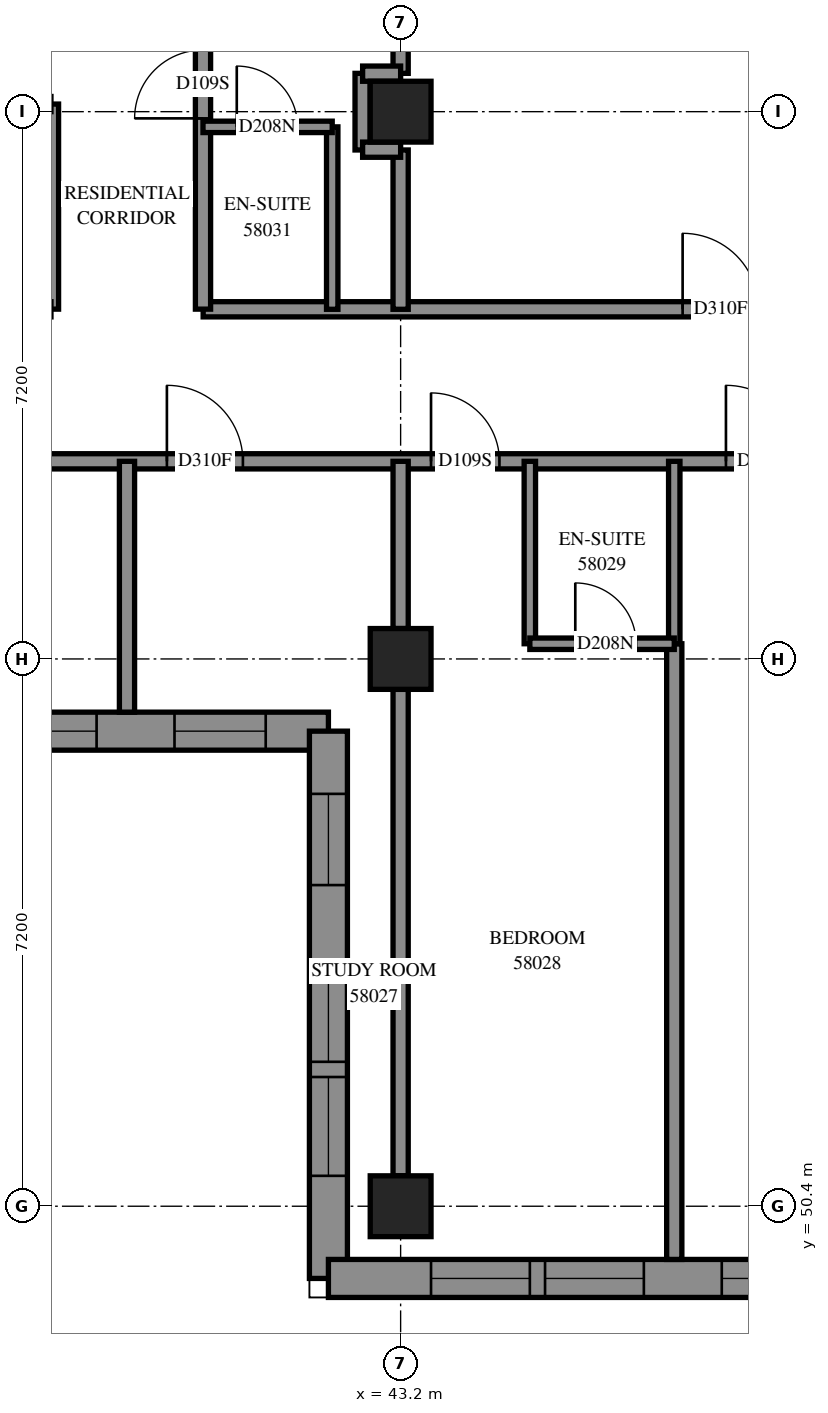
"""IFC4 building model, lengths in metres.
Left out: names, types, materials, properties, quantities, classifications, styles, units other than length and angle.
Written with IfcOpenShell. Run it as: python <this file> out.ifc"""

import sys

from ifc_helpers import new_model, si_unit, direction, frame, frame_2d, origin, origin_2d, place, context, subcontext, project, spatial, polyline, rectangle, outline, extrude, element, fill, save


model = new_model("IFC4")
c1 = context("Model", 3, precision=1e-05, world=origin(), true_north=direction((0.0, 1.0)))
c2 = subcontext(c1, "Body", "Model", "MODEL_VIEW")
j1 = project(units=[si_unit("LENGTHUNIT", "METRE"), si_unit("PLANEANGLEUNIT", "RADIAN")], contexts=[c1])
p1 = place(None, origin())
s1 = spatial("IfcSite", under=j1, at=p1, CompositionType="ELEMENT")
p2 = place(p1, origin())
s2 = spatial("IfcBuilding", under=s1, at=p2, CompositionType="ELEMENT")
p3 = place(p2, frame((0.0, 0.0, 213.4)))
s3 = spatial("IfcBuildingStorey", under=s2, at=p3, CompositionType="ELEMENT", Elevation=213.4)
for number, where, z_axis, x_axis in (
    (1, (43.2, 50.4, 0.0), (0.0, 0.0, 1.0), (1.0, 0.0, 0.0)),
    (2, (43.2, 57.6, 0.0), (0.0, 0.0, 1.0), (1.0, 0.0, 0.0)),
    (3, (43.2, 64.8, 0.0), (0.0, 0.0, 1.0), (1.0, 0.0, 0.0)),
):
    element("IfcColumn", number, at=place(p3, frame(where, z_axis=z_axis, x_axis=x_axis)), inside=s3, PredefinedType="COLUMN", context=c2, shape_type="SweptSolid", body=[
        extrude(rectangle(XDim=0.8, YDim=0.8, at=origin_2d()), origin(), (0.0, 0.0, 1.0), 3.1),
    ])
p4 = place(p3, frame((35.05, 56.65, 0.0), z_axis=(0.0, 0.0, 1.0), x_axis=(1.0, 0.0, 0.0)))
e4 = element("IfcWall", 4, at=p4, inside=s3, PredefinedType="SOLIDWALL", context=c2, shape_type="SweptSolid", body=[
    extrude(outline(polyline([(-0.25, -0.25), (6.95, -0.25), (7.45, 0.25), (0.25, 0.25), (-0.25, -0.25)])), origin(), (0.0, 0.0, 1.0), 3.1),
])
p5 = place(p4, frame((1.35, 0.0, 0.45)))
e5 = element("IfcOpeningElement", 5, at=p5, cuts=e4, PredefinedType="OPENING", context=c2, shape_type="SweptSolid", body=[
    extrude(rectangle(XDim=1.3, YDim=2.5, at=frame_2d((0.65, 1.25))), frame((0.0, 0.26, 0.0), z_axis=(0.0, -1.0, 0.0), x_axis=(1.0, 0.0, 0.0)), (0.0, 0.0, 1.0), 0.52),
])
p6 = place(p4, frame((2.85, 0.0, 0.45)))
e6 = element("IfcOpeningElement", 6, at=p6, cuts=e4, PredefinedType="OPENING", context=c2, shape_type="SweptSolid", body=[
    extrude(rectangle(XDim=1.3, YDim=2.5, at=frame_2d((0.65, 1.25))), frame((0.0, 0.26, 0.0), z_axis=(0.0, -1.0, 0.0), x_axis=(1.0, 0.0, 0.0)), (0.0, 0.0, 1.0), 0.52),
])
p7 = place(p4, frame((5.175, 0.0, 0.45)))
e7 = element("IfcOpeningElement", 7, at=p7, cuts=e4, PredefinedType="OPENING", context=c2, shape_type="SweptSolid", body=[
    extrude(rectangle(XDim=1.2, YDim=2.5, at=frame_2d((0.6, 1.25))), frame((0.0, 0.26, 0.0), z_axis=(0.0, -1.0, 0.0), x_axis=(1.0, 0.0, 0.0)), (0.0, 0.0, 1.0), 0.52),
])
p8 = place(p3, frame((42.25, 56.65, 0.0), z_axis=(0.0, 0.0, 1.0), x_axis=(0.0, -1.0, 0.0)))
e8 = element("IfcWall", 8, at=p8, inside=s3, PredefinedType="SOLIDWALL", context=c2, shape_type="SweptSolid", body=[
    extrude(outline(polyline([(0.25, -0.25), (7.45, -0.25), (6.95, 0.25), (-0.25, 0.25), (0.25, -0.25)])), origin(), (0.0, 0.0, 1.0), 3.1),
])
p9 = place(p8, frame((3.05, 0.0, 0.45)))
e9 = element("IfcOpeningElement", 9, at=p9, cuts=e8, PredefinedType="OPENING", context=c2, shape_type="SweptSolid", body=[
    extrude(rectangle(XDim=1.3, YDim=2.5, at=frame_2d((0.65, 1.25))), frame((0.0, 0.26, 0.0), z_axis=(0.0, -1.0, 0.0), x_axis=(1.0, 0.0, 0.0)), (0.0, 0.0, 1.0), 0.52),
])
p10 = place(p8, frame((4.55, 0.0, 0.45)))
e10 = element("IfcOpeningElement", 10, at=p10, cuts=e8, PredefinedType="OPENING", context=c2, shape_type="SweptSolid", body=[
    extrude(rectangle(XDim=1.3, YDim=2.5, at=frame_2d((0.65, 1.25))), frame((0.0, 0.26, 0.0), z_axis=(0.0, -1.0, 0.0), x_axis=(1.0, 0.0, 0.0)), (0.0, 0.0, 1.0), 0.52),
])
p11 = place(p8, frame((0.825, 0.0, 0.45)))
e11 = element("IfcOpeningElement", 11, at=p11, cuts=e8, PredefinedType="OPENING", context=c2, shape_type="SweptSolid", body=[
    extrude(rectangle(XDim=1.2, YDim=2.5, at=frame_2d((0.6, 1.25))), frame((0.0, 0.26, 0.0), z_axis=(0.0, -1.0, 0.0), x_axis=(1.0, 0.0, 0.0)), (0.0, 0.0, 1.0), 0.52),
])
p12 = place(p3, frame((42.25, 49.45, 0.0), z_axis=(0.0, 0.0, 1.0), x_axis=(1.0, 0.0, 0.0)))
e12 = element("IfcWall", 12, at=p12, inside=s3, PredefinedType="SOLIDWALL", context=c2, shape_type="SweptSolid", body=[
    extrude(outline(polyline([(-0.25, -0.25), (6.95, -0.25), (7.45, 0.25), (0.25, 0.25), (-0.25, -0.25)])), origin(), (0.0, 0.0, 1.0), 3.1),
])
p13 = place(p12, frame((1.35, 0.0, 0.45)))
e13 = element("IfcOpeningElement", 13, at=p13, cuts=e12, PredefinedType="OPENING", context=c2, shape_type="SweptSolid", body=[
    extrude(rectangle(XDim=1.3, YDim=2.5, at=frame_2d((0.65, 1.25))), frame((0.0, 0.26, 0.0), z_axis=(0.0, -1.0, 0.0), x_axis=(1.0, 0.0, 0.0)), (0.0, 0.0, 1.0), 0.52),
])
p14 = place(p12, frame((2.85, 0.0, 0.45)))
e14 = element("IfcOpeningElement", 14, at=p14, cuts=e12, PredefinedType="OPENING", context=c2, shape_type="SweptSolid", body=[
    extrude(rectangle(XDim=1.3, YDim=2.5, at=frame_2d((0.65, 1.25))), frame((0.0, 0.26, 0.0), z_axis=(0.0, -1.0, 0.0), x_axis=(1.0, 0.0, 0.0)), (0.0, 0.0, 1.0), 0.52),
])
p15 = place(p12, frame((5.175, 0.0, 0.45)))
e15 = element("IfcOpeningElement", 15, at=p15, cuts=e12, PredefinedType="OPENING", context=c2, shape_type="SweptSolid", body=[
    extrude(rectangle(XDim=1.2, YDim=2.5, at=frame_2d((0.6, 1.25))), frame((0.0, 0.26, 0.0), z_axis=(0.0, -1.0, 0.0), x_axis=(1.0, 0.0, 0.0)), (0.0, 0.0, 1.0), 0.52),
])
p16 = place(p3, frame((36.0, 60.2, 0.0), z_axis=(0.0, 0.0, 1.0), x_axis=(1.0, 0.0, 0.0)))
e16 = element("IfcWall", 16, at=p16, inside=s3, PredefinedType="PARTITIONING", context=c2, shape_type="SweptSolid", body=[
    extrude(rectangle(XDim=17.0, YDim=0.2, at=frame_2d((8.5, 0.0))), origin(), (0.0, 0.0, 1.0), 3.1),
])
p17 = place(p16, frame((4.125, 0.0, 0.0)))
e17 = element("IfcOpeningElement", 17, at=p17, cuts=e16, PredefinedType="OPENING", context=c2, shape_type="SweptSolid", body=[
    extrude(rectangle(XDim=1.0, YDim=2.1, at=frame_2d((0.5, 1.05))), frame((0.0, 0.11, 0.0), z_axis=(0.0, -1.0, 0.0), x_axis=(1.0, 0.0, 0.0)), (0.0, 0.0, 1.0), 0.22),
])
p18 = place(p16, frame((7.6, 0.0, 0.0)))
e18 = element("IfcOpeningElement", 18, at=p18, cuts=e16, PredefinedType="OPENING", context=c2, shape_type="SweptSolid", body=[
    extrude(rectangle(XDim=0.9, YDim=2.1, at=frame_2d((0.45, 1.05))), frame((0.0, 0.11, 0.0), z_axis=(0.0, -1.0, 0.0), x_axis=(1.0, 0.0, 0.0)), (0.0, 0.0, 1.0), 0.22),
])
p19 = place(p16, frame((11.48, 0.0, 0.0)))
e19 = element("IfcOpeningElement", 19, at=p19, cuts=e16, PredefinedType="OPENING", context=c2, shape_type="SweptSolid", body=[
    extrude(rectangle(XDim=1.0, YDim=2.1, at=frame_2d((0.5, 1.05))), frame((0.0, 0.11, 0.0), z_axis=(0.0, -1.0, 0.0), x_axis=(1.0, 0.0, 0.0)), (0.0, 0.0, 1.0), 0.22),
])
p20 = place(p16, frame((15.805, 0.0, 0.0)))
e20 = element("IfcOpeningElement", 20, at=p20, cuts=e16, PredefinedType="OPENING", context=c2, shape_type="SweptSolid", body=[
    extrude(rectangle(XDim=1.0, YDim=2.1, at=frame_2d((0.5, 1.05))), frame((0.0, 0.11, 0.0), z_axis=(0.0, -1.0, 0.0), x_axis=(1.0, 0.0, 0.0)), (0.0, 0.0, 1.0), 0.22),
])
p21 = place(p3, frame((40.602, 62.2, 0.0), z_axis=(0.0, 0.0, 1.0), x_axis=(1.0, 0.0, 0.0)))
e21 = element("IfcWall", 21, at=p21, inside=s3, PredefinedType="PARTITIONING", context=c2, shape_type="SweptSolid", body=[
    extrude(rectangle(XDim=14.998, YDim=0.2, at=frame_2d((7.499, 0.0))), origin(), (0.0, 0.0, 1.0), 3.1),
])
p22 = place(p21, frame((6.308, 0.0, 0.0)))
e22 = element("IfcOpeningElement", 22, at=p22, cuts=e21, PredefinedType="OPENING", context=c2, shape_type="SweptSolid", body=[
    extrude(rectangle(XDim=1.0, YDim=2.1, at=frame_2d((0.5, 1.05))), frame((0.0, 0.11, 0.0), z_axis=(0.0, -1.0, 0.0), x_axis=(1.0, 0.0, 0.0)), (0.0, 0.0, 1.0), 0.22),
])
p23 = place(p21, frame((9.928, 0.0, 0.0)))
e23 = element("IfcOpeningElement", 23, at=p23, cuts=e21, PredefinedType="OPENING", context=c2, shape_type="SweptSolid", body=[
    extrude(rectangle(XDim=0.9, YDim=2.1, at=frame_2d((0.45, 1.05))), frame((0.0, 0.11, 0.0), z_axis=(0.0, -1.0, 0.0), x_axis=(1.0, 0.0, 0.0)), (0.0, 0.0, 1.0), 0.22),
])
p24 = place(p21, frame((13.746, 0.0, 0.0)))
e24 = element("IfcOpeningElement", 24, at=p24, cuts=e21, PredefinedType="OPENING", context=c2, shape_type="SweptSolid", body=[
    extrude(rectangle(XDim=1.0, YDim=2.1, at=frame_2d((0.5, 1.05))), frame((0.0, 0.11, 0.0), z_axis=(0.0, -1.0, 0.0), x_axis=(1.0, 0.0, 0.0)), (0.0, 0.0, 1.0), 0.22),
])
p25 = place(p3, frame((46.8, 49.7, 0.0), z_axis=(0.0, 0.0, 1.0), x_axis=(0.0, 1.0, 0.0)))
e25 = element("IfcWall", 25, at=p25, inside=s3, PredefinedType="PARTITIONING", context=c2, shape_type="SweptSolid", body=[
    extrude(rectangle(XDim=8.1, YDim=0.2, at=frame_2d((4.05, 0.0))), origin(), (0.0, 0.0, 1.0), 3.1),
])
p26 = place(p3, frame((43.2, 50.8, 0.0), z_axis=(0.0, 0.0, 1.0), x_axis=(0.0, 1.0, 0.0)))
e26 = element("IfcWall", 26, at=p26, inside=s3, PredefinedType="PARTITIONING", context=c2, shape_type="SweptSolid", body=[
    extrude(rectangle(XDim=6.4, YDim=0.2, at=frame_2d((3.2, 0.0))), origin(), (0.0, 0.0, 1.0), 2.6),
])
p27 = place(p3, frame((43.2, 65.304, 0.0), z_axis=(0.0, 0.0, 1.0), x_axis=(0.0, 1.0, 0.0)))
e27 = element("IfcWall", 27, at=p27, inside=s3, PredefinedType="PARTITIONING", context=c2, shape_type="SweptSolid", body=[
    extrude(rectangle(XDim=6.192, YDim=0.2, at=frame_2d((3.096, 0.0))), origin(), (0.0, 0.0, 1.0), 3.1),
])
p28 = place(p3, frame((40.6, 62.202, 0.0), z_axis=(0.0, 0.0, 1.0), x_axis=(0.0, 1.0, 0.0)))
e28 = element("IfcWall", 28, at=p28, inside=s3, PredefinedType="PARTITIONING", context=c2, shape_type="SweptSolid", body=[
    extrude(rectangle(XDim=4.698, YDim=0.2, at=frame_2d((2.349, 0.0))), origin(), (0.0, 0.0, 1.0), 3.1),
])
p29 = place(p28, frame((2.51, 0.0, 0.0)))
e29 = element("IfcOpeningElement", 29, at=p29, cuts=e28, PredefinedType="OPENING", context=c2, shape_type="SweptSolid", body=[
    extrude(rectangle(XDim=0.9, YDim=2.1, at=frame_2d((0.45, 1.05))), frame((0.0, 0.11, 0.0), z_axis=(0.0, -1.0, 0.0), x_axis=(1.0, 0.0, 0.0)), (0.0, 0.0, 1.0), 0.22),
])
p30 = place(p3, frame((39.6, 56.9, 0.0), z_axis=(0.0, 0.0, 1.0), x_axis=(0.0, 1.0, 0.0)))
e30 = element("IfcWall", 30, at=p30, inside=s3, PredefinedType="PARTITIONING", context=c2, shape_type="SweptSolid", body=[
    extrude(rectangle(XDim=3.3, YDim=0.2, at=frame_2d((1.65, 0.0))), origin(), (0.0, 0.0, 1.0), 3.1),
])
p31 = place(p3, frame((38.6, 62.202, 0.0), z_axis=(0.0, 0.0, 1.0), x_axis=(0.0, 1.0, 0.0)))
e31 = element("IfcWall", 31, at=p31, inside=s3, PredefinedType="PARTITIONING", context=c2, shape_type="SweptSolid", body=[
    extrude(rectangle(XDim=2.698, YDim=0.2, at=frame_2d((1.349, 0.0))), origin(), (0.0, 0.0, 1.0), 3.1),
])
for number, where, z_axis, x_axis in (
    (32, (44.9, 57.8, 0.0), (0.0, 0.0, 1.0), (0.0, 1.0, 0.0)),
    (33, (46.8, 57.8, 0.0), (0.0, 0.0, 1.0), (0.0, 1.0, 0.0)),
    (34, (42.3, 62.2, 0.0), (0.0, 0.0, 1.0), (0.0, 1.0, 0.0)),
):
    element("IfcWall", number, at=place(p3, frame(where, z_axis=z_axis, x_axis=x_axis)), inside=s3, PredefinedType="PARTITIONING", context=c2, shape_type="SweptSolid", body=[
        extrude(rectangle(XDim=2.4, YDim=0.15, at=frame_2d((1.2, 0.0))), origin(), (0.0, 0.0, 1.0), 3.1),
    ])
p32 = place(p3, frame((43.2, 58.0, 0.0), z_axis=(0.0, 0.0, 1.0), x_axis=(0.0, 1.0, 0.0)))
e35 = element("IfcWall", 35, at=p32, inside=s3, PredefinedType="PARTITIONING", context=c2, shape_type="SweptSolid", body=[
    extrude(rectangle(XDim=2.2, YDim=0.2, at=frame_2d((1.1, 0.0))), origin(), (0.0, 0.0, 1.0), 3.1),
])
p33 = place(p3, frame((43.2, 62.2, 0.0), z_axis=(0.0, 0.0, 1.0), x_axis=(0.0, 1.0, 0.0)))
e36 = element("IfcWall", 36, at=p33, inside=s3, PredefinedType="PARTITIONING", context=c2, shape_type="SweptSolid", body=[
    extrude(rectangle(XDim=2.096, YDim=0.2, at=frame_2d((1.048, 0.0))), origin(), (0.0, 0.0, 1.0), 3.1),
])
p34 = place(p3, frame((44.9, 57.8, 0.0), z_axis=(0.0, 0.0, 1.0), x_axis=(1.0, 0.0, 0.0)))
e37 = element("IfcWall", 37, at=p34, inside=s3, PredefinedType="PARTITIONING", context=c2, shape_type="SweptSolid", body=[
    extrude(rectangle(XDim=1.9, YDim=0.15, at=frame_2d((0.95, 0.0))), origin(), (0.0, 0.0, 1.0), 3.1),
])
p35 = place(p34, frame((0.598, 0.0, 0.0)))
e38 = element("IfcOpeningElement", 38, at=p35, cuts=e37, PredefinedType="OPENING", context=c2, shape_type="SweptSolid", body=[
    extrude(rectangle(XDim=0.8, YDim=2.1, at=frame_2d((0.4, 1.05))), frame((0.0, 0.085, 0.0), z_axis=(0.0, -1.0, 0.0), x_axis=(1.0, 0.0, 0.0)), (0.0, 0.0, 1.0), 0.17),
])
p36 = place(p3, frame((40.6, 64.6, 0.0), z_axis=(0.0, 0.0, 1.0), x_axis=(1.0, 0.0, 0.0)))
e39 = element("IfcWall", 39, at=p36, inside=s3, PredefinedType="PARTITIONING", context=c2, shape_type="SweptSolid", body=[
    extrude(rectangle(XDim=1.7, YDim=0.15, at=frame_2d((0.85, 0.0))), origin(), (0.0, 0.0, 1.0), 3.1),
])
p37 = place(p36, frame((0.444, 0.0, 0.0)))
e40 = element("IfcOpeningElement", 40, at=p37, cuts=e39, PredefinedType="OPENING", context=c2, shape_type="SweptSolid", body=[
    extrude(rectangle(XDim=0.8, YDim=2.1, at=frame_2d((0.4, 1.05))), frame((0.0, 0.085, 0.0), z_axis=(0.0, -1.0, 0.0), x_axis=(1.0, 0.0, 0.0)), (0.0, 0.0, 1.0), 0.17),
])
p38 = place(p3, frame((42.7, 64.296, 0.0), z_axis=(0.0, 0.0, 1.0), x_axis=(0.0, 1.0, 0.0)))
e41 = element("IfcWall", 41, at=p38, inside=s3, PredefinedType="PARTITIONING", context=c2, shape_type="SweptSolid", body=[
    extrude(rectangle(XDim=1.008, YDim=0.2, at=frame_2d((0.504, 0.0))), origin(), (0.0, 0.0, 1.0), 3.1),
])
for number, where, z_axis, x_axis in (
    (42, (42.7, 65.3, 0.0), (0.0, 0.0, 1.0), (1.0, 0.0, 0.0)),
    (43, (42.7, 64.3, 0.0), (0.0, 0.0, 1.0), (1.0, 0.0, 0.0)),
):
    element("IfcWall", number, at=place(p3, frame(where, z_axis=z_axis, x_axis=x_axis)), inside=s3, PredefinedType="PARTITIONING", context=c2, shape_type="SweptSolid", body=[
        extrude(rectangle(XDim=0.5, YDim=0.2, at=frame_2d((0.25, 0.0))), origin(), (0.0, 0.0, 1.0), 3.1),
    ])
p39 = place(p6, origin())
e44 = element("IfcWindow", 44, at=p39, inside=s3, PartitioningType="SINGLE_PANEL", PredefinedType="WINDOW", context=c2, shape_type="SweptSolid", body=[
    extrude(rectangle(XDim=1.3, YDim=2.5, at=frame_2d((0.65, 1.25))), frame((0.0, 0.18, 0.0), z_axis=(0.0, -1.0, 0.0), x_axis=(1.0, 0.0, 0.0)), (0.0, 0.0, 1.0), 0.06),
])
fill(e6, e44)
p40 = place(p7, origin())
e45 = element("IfcWindow", 45, at=p40, inside=s3, PartitioningType="SINGLE_PANEL", PredefinedType="WINDOW", context=c2, shape_type="SweptSolid", body=[
    extrude(rectangle(XDim=1.2, YDim=2.5, at=frame_2d((0.6, 1.25))), frame((0.0, 0.18, 0.0), z_axis=(0.0, -1.0, 0.0), x_axis=(1.0, 0.0, 0.0)), (0.0, 0.0, 1.0), 0.06),
])
fill(e7, e45)
p41 = place(p9, origin())
e46 = element("IfcWindow", 46, at=p41, inside=s3, PartitioningType="SINGLE_PANEL", PredefinedType="WINDOW", context=c2, shape_type="SweptSolid", body=[
    extrude(rectangle(XDim=1.3, YDim=2.5, at=frame_2d((0.65, 1.25))), frame((0.0, 0.18, 0.0), z_axis=(0.0, -1.0, 0.0), x_axis=(1.0, 0.0, 0.0)), (0.0, 0.0, 1.0), 0.06),
])
fill(e9, e46)
p42 = place(p10, origin())
e47 = element("IfcWindow", 47, at=p42, inside=s3, PartitioningType="SINGLE_PANEL", PredefinedType="WINDOW", context=c2, shape_type="SweptSolid", body=[
    extrude(rectangle(XDim=1.3, YDim=2.5, at=frame_2d((0.65, 1.25))), frame((0.0, 0.18, 0.0), z_axis=(0.0, -1.0, 0.0), x_axis=(1.0, 0.0, 0.0)), (0.0, 0.0, 1.0), 0.06),
])
fill(e10, e47)
p43 = place(p11, origin())
e48 = element("IfcWindow", 48, at=p43, inside=s3, PartitioningType="SINGLE_PANEL", PredefinedType="WINDOW", context=c2, shape_type="SweptSolid", body=[
    extrude(rectangle(XDim=1.2, YDim=2.5, at=frame_2d((0.6, 1.25))), frame((0.0, 0.18, 0.0), z_axis=(0.0, -1.0, 0.0), x_axis=(1.0, 0.0, 0.0)), (0.0, 0.0, 1.0), 0.06),
])
fill(e11, e48)
p44 = place(p13, origin())
e49 = element("IfcWindow", 49, at=p44, inside=s3, PartitioningType="SINGLE_PANEL", PredefinedType="WINDOW", context=c2, shape_type="SweptSolid", body=[
    extrude(rectangle(XDim=1.3, YDim=2.5, at=frame_2d((0.65, 1.25))), frame((0.0, 0.18, 0.0), z_axis=(0.0, -1.0, 0.0), x_axis=(1.0, 0.0, 0.0)), (0.0, 0.0, 1.0), 0.06),
])
fill(e13, e49)
p45 = place(p14, origin())
e50 = element("IfcWindow", 50, at=p45, inside=s3, PartitioningType="SINGLE_PANEL", PredefinedType="WINDOW", context=c2, shape_type="SweptSolid", body=[
    extrude(rectangle(XDim=1.3, YDim=2.5, at=frame_2d((0.65, 1.25))), frame((0.0, 0.18, 0.0), z_axis=(0.0, -1.0, 0.0), x_axis=(1.0, 0.0, 0.0)), (0.0, 0.0, 1.0), 0.06),
])
fill(e14, e50)
p46 = place(p15, origin())
e51 = element("IfcWindow", 51, at=p46, inside=s3, PartitioningType="SINGLE_PANEL", PredefinedType="WINDOW", context=c2, shape_type="SweptSolid", body=[
    extrude(rectangle(XDim=1.2, YDim=2.5, at=frame_2d((0.6, 1.25))), frame((0.0, 0.18, 0.0), z_axis=(0.0, -1.0, 0.0), x_axis=(1.0, 0.0, 0.0)), (0.0, 0.0, 1.0), 0.06),
])
fill(e15, e51)
p47 = place(p17, origin())
e52 = element("IfcDoor", 52, at=p47, inside=s3, OperationType="SINGLE_SWING_RIGHT", PredefinedType="DOOR", context=c2, shape_type="SweptSolid", body=[
    extrude(rectangle(XDim=1.0, YDim=2.1, at=frame_2d((0.5, 1.05))), frame((0.0, 0.025, 0.0), z_axis=(0.0, -1.0, 0.0), x_axis=(1.0, 0.0, 0.0)), (0.0, 0.0, 1.0), 0.05),
])
fill(e17, e52)
p48 = place(p18, origin())
e53 = element("IfcDoor", 53, at=p48, inside=s3, OperationType="SINGLE_SWING_LEFT", PredefinedType="DOOR", context=c2, shape_type="SweptSolid", body=[
    extrude(rectangle(XDim=0.9, YDim=2.1, at=frame_2d((0.45, 1.05))), frame((0.0, 0.025, 0.0), z_axis=(0.0, -1.0, 0.0), x_axis=(1.0, 0.0, 0.0)), (0.0, 0.0, 1.0), 0.05),
])
fill(e18, e53)
p49 = place(p35, origin())
e54 = element("IfcDoor", 54, at=p49, inside=s3, OperationType="SINGLE_SWING_RIGHT", PredefinedType="DOOR", context=c2, shape_type="SweptSolid", body=[
    extrude(rectangle(XDim=0.8, YDim=2.1, at=frame_2d((0.4, 1.05))), frame((0.0, 0.025, 0.0), z_axis=(0.0, -1.0, 0.0), x_axis=(1.0, 0.0, 0.0)), (0.0, 0.0, 1.0), 0.05),
])
fill(e38, e54)
p50 = place(p29, origin())
e55 = element("IfcDoor", 55, at=p50, inside=s3, OperationType="SINGLE_SWING_LEFT", PredefinedType="DOOR", context=c2, shape_type="SweptSolid", body=[
    extrude(rectangle(XDim=0.9, YDim=2.1, at=frame_2d((0.45, 1.05))), frame((0.0, 0.025, 0.0), z_axis=(0.0, -1.0, 0.0), x_axis=(1.0, 0.0, 0.0)), (0.0, 0.0, 1.0), 0.05),
])
fill(e29, e55)
p51 = place(p37, origin())
e56 = element("IfcDoor", 56, at=p51, inside=s3, OperationType="SINGLE_SWING_RIGHT", PredefinedType="DOOR", context=c2, shape_type="SweptSolid", body=[
    extrude(rectangle(XDim=0.8, YDim=2.1, at=frame_2d((0.4, 1.05))), frame((0.0, 0.025, 0.0), z_axis=(0.0, -1.0, 0.0), x_axis=(1.0, 0.0, 0.0)), (0.0, 0.0, 1.0), 0.05),
])
fill(e40, e56)
p52 = place(p22, origin())
e57 = element("IfcDoor", 57, at=p52, inside=s3, OperationType="SINGLE_SWING_RIGHT", PredefinedType="DOOR", context=c2, shape_type="SweptSolid", body=[
    extrude(rectangle(XDim=1.0, YDim=2.1, at=frame_2d((0.5, 1.05))), frame((0.0, 0.025, 0.0), z_axis=(0.0, -1.0, 0.0), x_axis=(1.0, 0.0, 0.0)), (0.0, 0.0, 1.0), 0.05),
])
fill(e22, e57)
p53 = place(p19, origin())
e58 = element("IfcDoor", 58, at=p53, inside=s3, OperationType="SINGLE_SWING_RIGHT", PredefinedType="DOOR", context=c2, shape_type="SweptSolid", body=[
    extrude(rectangle(XDim=1.0, YDim=2.1, at=frame_2d((0.5, 1.05))), frame((0.0, 0.025, 0.0), z_axis=(0.0, -1.0, 0.0), x_axis=(1.0, 0.0, 0.0)), (0.0, 0.0, 1.0), 0.05),
])
fill(e19, e58)
save(model, sys.argv[1])
